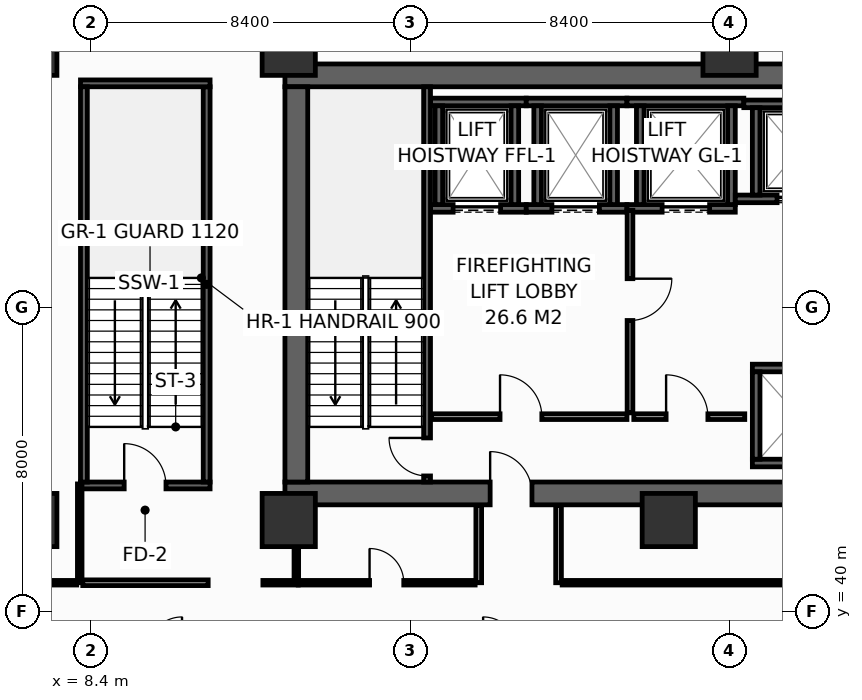
"""IFC4 building model, lengths in metres.
Left out: names, types, materials, properties, quantities, classifications, styles, units other than length and angle.
Written with IfcOpenShell. Run it as: python <this file> out.ifc"""

import sys

from ifc_helpers import new_model, si_unit, direction, frame, frame_2d, origin, origin_2d, place, context, subcontext, project, spatial, rectangle, hollow_rectangle, extrude, element, fill, save


model = new_model("IFC4")
c1 = context("Model", 3, precision=1e-05, world=origin(), true_north=direction((0.0, 1.0)))
c2 = subcontext(c1, "Body", "Model", "MODEL_VIEW")
j1 = project(units=[si_unit("LENGTHUNIT", "METRE"), si_unit("PLANEANGLEUNIT", "RADIAN")], contexts=[c1])
p1 = place(None, origin())
s1 = spatial("IfcSite", under=j1, at=p1, CompositionType="ELEMENT")
p2 = place(p1, origin())
s2 = spatial("IfcBuilding", under=s1, at=p2, CompositionType="ELEMENT")
p3 = place(p2, frame((0.0, 0.0, 33.0)))
s3 = spatial("IfcBuildingStorey", under=s2, at=p3, CompositionType="ELEMENT", Elevation=33.0)
p4 = place(p3, frame((13.5, 43.1, 0.0), z_axis=(0.0, 0.0, 1.0), x_axis=(1.0, 0.0, 0.0)))
e1 = element("IfcWall", 1, at=p4, inside=s3, PredefinedType="SHEAR", context=c2, shape_type="SweptSolid", body=[
    extrude(rectangle(XDim=32.9, YDim=0.6, at=frame_2d((16.45, 0.0))), origin(), (0.0, 0.0, 1.0), 4.95),
])
p5 = place(p4, frame((5.4, 0.0, 0.0)))
e2 = element("IfcOpeningElement", 2, at=p5, cuts=e1, PredefinedType="OPENING", context=c2, shape_type="SweptSolid", body=[
    extrude(rectangle(XDim=1.1, YDim=2.15, at=frame_2d((0.55, 1.075))), frame((0.0, 0.31, 0.0), z_axis=(0.0, -1.0, 0.0), x_axis=(1.0, 0.0, 0.0)), (0.0, 0.0, 1.0), 0.62),
])
p6 = place(p4, frame((25.6, 0.0, 0.0)))
e3 = element("IfcOpeningElement", 3, at=p6, cuts=e1, PredefinedType="OPENING", context=c2, shape_type="SweptSolid", body=[
    extrude(rectangle(XDim=1.1, YDim=2.15, at=frame_2d((0.55, 1.075))), frame((0.0, 0.31, 0.0), z_axis=(0.0, -1.0, 0.0), x_axis=(1.0, 0.0, 0.0)), (0.0, 0.0, 1.0), 0.62),
])
p7 = place(p3, frame((13.5, 54.1, 0.0), z_axis=(0.0, 0.0, 1.0), x_axis=(1.0, 0.0, 0.0)))
e4 = element("IfcWall", 4, at=p7, inside=s3, PredefinedType="SHEAR", context=c2, shape_type="SweptSolid", body=[
    extrude(rectangle(XDim=32.9, YDim=0.6, at=frame_2d((16.45, 0.0))), origin(), (0.0, 0.0, 1.0), 4.95),
])
p8 = place(p3, frame((13.8, 43.4, 0.0), z_axis=(0.0, 0.0, 1.0), x_axis=(0.0, 1.0, 0.0)))
e5 = element("IfcWall", 5, at=p8, inside=s3, PredefinedType="SHEAR", context=c2, shape_type="SweptSolid", body=[
    extrude(rectangle(XDim=10.4, YDim=0.6, at=frame_2d((5.2, 0.0))), origin(), (0.0, 0.0, 1.0), 4.95),
])
for number, where, z_axis, x_axis in (
    (6, (6.8, 54.8, 0.0), (0.0, 0.0, 1.0), (1.0, 0.0, 0.0)),
    (7, (13.6, 54.8, 0.0), (0.0, 0.0, 1.0), (1.0, 0.0, 0.0)),
    (8, (25.2, 54.8, 0.0), (0.0, 0.0, 1.0), (1.0, 0.0, 0.0)),
    (9, (6.8, 42.4, 0.0), (0.0, 0.0, 1.0), (1.0, 0.0, 0.0)),
    (10, (13.6, 42.4, 0.0), (0.0, 0.0, 1.0), (1.0, 0.0, 0.0)),
    (11, (23.6, 42.4, 0.0), (0.0, 0.0, 1.0), (1.0, 0.0, 0.0)),
):
    element("IfcColumn", number, at=place(p3, frame(where, z_axis=z_axis, x_axis=x_axis)), inside=s3, PredefinedType="COLUMN", context=c2, shape_type="SweptSolid", body=[
        extrude(hollow_rectangle(XDim=1.4, YDim=1.4, WallThickness=0.065, at=origin_2d()), origin(), (0.0, 0.0, 1.0), 5.4),
    ])
p9 = place(p3, frame((17.33, 50.6, 0.0), z_axis=(0.0, 0.0, 1.0), x_axis=(1.0, 0.0, 0.0)))
e12 = element("IfcWall", 12, at=p9, inside=s3, PredefinedType="SHEAR", context=c2, shape_type="SweptSolid", body=[
    extrude(rectangle(XDim=2.52, YDim=0.2, at=frame_2d((1.26, 0.0))), origin(), (0.0, 0.0, 1.0), 4.95),
])
p10 = place(p9, frame((0.595, 0.0, 0.0)))
e13 = element("IfcOpeningElement", 13, at=p10, cuts=e12, PredefinedType="OPENING", context=c2, shape_type="SweptSolid", body=[
    extrude(rectangle(XDim=1.25, YDim=2.3, at=frame_2d((0.625, 1.15))), frame((0.0, 0.11, 0.0), z_axis=(0.0, -1.0, 0.0), x_axis=(1.0, 0.0, 0.0)), (0.0, 0.0, 1.0), 0.22),
])
p11 = place(p3, frame((17.33, 53.4, 0.0), z_axis=(0.0, 0.0, 1.0), x_axis=(1.0, 0.0, 0.0)))
e14 = element("IfcWall", 14, at=p11, inside=s3, PredefinedType="SHEAR", context=c2, shape_type="SweptSolid", body=[
    extrude(rectangle(XDim=2.52, YDim=0.2, at=frame_2d((1.26, 0.0))), origin(), (0.0, 0.0, 1.0), 4.95),
])
for number, where, z_axis, x_axis in (
    (15, (17.55, 50.7, 0.0), (0.0, 0.0, 1.0), (0.0, 1.0, 0.0)),
    (16, (19.55, 50.7, 0.0), (0.0, 0.0, 1.0), (0.0, 1.0, 0.0)),
):
    element("IfcWall", number, at=place(p3, frame(where, z_axis=z_axis, x_axis=x_axis)), inside=s3, PredefinedType="SHEAR", context=c2, shape_type="SweptSolid", body=[
        extrude(rectangle(XDim=2.6, YDim=0.2, at=frame_2d((1.3, 0.0))), origin(), (0.0, 0.0, 1.0), 4.95),
    ])
p12 = place(p3, frame((19.85, 50.6, 0.0), z_axis=(0.0, 0.0, 1.0), x_axis=(1.0, 0.0, 0.0)))
e17 = element("IfcWall", 17, at=p12, inside=s3, PredefinedType="SHEAR", context=c2, shape_type="SweptSolid", body=[
    extrude(rectangle(XDim=2.65, YDim=0.2, at=frame_2d((1.325, 0.0))), origin(), (0.0, 0.0, 1.0), 4.95),
])
p13 = place(p12, frame((0.675, 0.0, 0.0)))
e18 = element("IfcOpeningElement", 18, at=p13, cuts=e17, PredefinedType="OPENING", context=c2, shape_type="SweptSolid", body=[
    extrude(rectangle(XDim=1.25, YDim=2.3, at=frame_2d((0.625, 1.15))), frame((0.0, 0.11, 0.0), z_axis=(0.0, -1.0, 0.0), x_axis=(1.0, 0.0, 0.0)), (0.0, 0.0, 1.0), 0.22),
])
p14 = place(p3, frame((19.85, 53.4, 0.0), z_axis=(0.0, 0.0, 1.0), x_axis=(1.0, 0.0, 0.0)))
e19 = element("IfcWall", 19, at=p14, inside=s3, PredefinedType="SHEAR", context=c2, shape_type="SweptSolid", body=[
    extrude(rectangle(XDim=2.65, YDim=0.2, at=frame_2d((1.325, 0.0))), origin(), (0.0, 0.0, 1.0), 4.95),
])
for number, where, z_axis, x_axis in (
    (20, (20.15, 50.7, 0.0), (0.0, 0.0, 1.0), (0.0, 1.0, 0.0)),
    (21, (22.15, 50.7, 0.0), (0.0, 0.0, 1.0), (0.0, 1.0, 0.0)),
):
    element("IfcWall", number, at=place(p3, frame(where, z_axis=z_axis, x_axis=x_axis)), inside=s3, PredefinedType="SHEAR", context=c2, shape_type="SweptSolid", body=[
        extrude(rectangle(XDim=2.6, YDim=0.2, at=frame_2d((1.3, 0.0))), origin(), (0.0, 0.0, 1.0), 4.95),
    ])
p15 = place(p3, frame((22.5, 50.6, 0.0), z_axis=(0.0, 0.0, 1.0), x_axis=(1.0, 0.0, 0.0)))
e22 = element("IfcWall", 22, at=p15, inside=s3, PredefinedType="SHEAR", context=c2, shape_type="SweptSolid", body=[
    extrude(rectangle(XDim=2.85, YDim=0.2, at=frame_2d((1.425, 0.0))), origin(), (0.0, 0.0, 1.0), 4.95),
])
p16 = place(p15, frame((0.925, 0.0, 0.0)))
e23 = element("IfcOpeningElement", 23, at=p16, cuts=e22, PredefinedType="OPENING", context=c2, shape_type="SweptSolid", body=[
    extrude(rectangle(XDim=1.25, YDim=2.3, at=frame_2d((0.625, 1.15))), frame((0.0, 0.11, 0.0), z_axis=(0.0, -1.0, 0.0), x_axis=(1.0, 0.0, 0.0)), (0.0, 0.0, 1.0), 0.22),
])
p17 = place(p3, frame((22.5, 53.4, 0.0), z_axis=(0.0, 0.0, 1.0), x_axis=(1.0, 0.0, 0.0)))
e24 = element("IfcWall", 24, at=p17, inside=s3, PredefinedType="SHEAR", context=c2, shape_type="SweptSolid", body=[
    extrude(rectangle(XDim=3.075, YDim=0.2, at=frame_2d((1.538, 0.0))), origin(), (0.0, 0.0, 1.0), 4.95),
])
for number, where, z_axis, x_axis in (
    (25, (22.85, 50.7, 0.0), (0.0, 0.0, 1.0), (0.0, 1.0, 0.0)),
    (26, (25.25, 50.7, 0.0), (0.0, 0.0, 1.0), (0.0, 1.0, 0.0)),
):
    element("IfcWall", number, at=place(p3, frame(where, z_axis=z_axis, x_axis=x_axis)), inside=s3, PredefinedType="SHEAR", context=c2, shape_type="SweptSolid", body=[
        extrude(rectangle(XDim=2.6, YDim=0.2, at=frame_2d((1.3, 0.0))), origin(), (0.0, 0.0, 1.0), 4.95),
    ])
p18 = place(p3, frame((25.35, 50.85, 0.0), z_axis=(0.0, 0.0, 1.0), x_axis=(1.0, 0.0, 0.0)))
e27 = element("IfcWall", 27, at=p18, inside=s3, PredefinedType="SHEAR", context=c2, shape_type="SweptSolid", body=[
    extrude(rectangle(XDim=3.025, YDim=0.2, at=frame_2d((1.512, 0.0))), origin(), (0.0, 0.0, 1.0), 4.95),
])
p19 = place(p18, frame((1.1, 0.0, 0.0)))
e28 = element("IfcOpeningElement", 28, at=p19, cuts=e27, PredefinedType="OPENING", context=c2, shape_type="SweptSolid", body=[
    extrude(rectangle(XDim=1.1, YDim=2.2, at=frame_2d((0.55, 1.1))), frame((0.0, 0.11, 0.0), z_axis=(0.0, -1.0, 0.0), x_axis=(1.0, 0.0, 0.0)), (0.0, 0.0, 1.0), 0.22),
])
p20 = place(p3, frame((25.575, 53.35, 0.0), z_axis=(0.0, 0.0, 1.0), x_axis=(1.0, 0.0, 0.0)))
e29 = element("IfcWall", 29, at=p20, inside=s3, PredefinedType="SHEAR", context=c2, shape_type="SweptSolid", body=[
    extrude(rectangle(XDim=2.8, YDim=0.2, at=frame_2d((1.4, 0.0))), origin(), (0.0, 0.0, 1.0), 4.95),
])
p21 = place(p3, frame((25.9, 50.95, 0.0), z_axis=(0.0, 0.0, 1.0), x_axis=(0.0, 1.0, 0.0)))
e30 = element("IfcWall", 30, at=p21, inside=s3, PredefinedType="SHEAR", context=c2, shape_type="SweptSolid", body=[
    extrude(rectangle(XDim=2.3, YDim=0.2, at=frame_2d((1.15, 0.0))), origin(), (0.0, 0.0, 1.0), 4.95),
])
for number, where, z_axis, x_axis in (
    (31, (25.8, 43.9, 0.0), (0.0, 0.0, 1.0), (1.0, 0.0, 0.0)),
    (32, (25.8, 46.4, 0.0), (0.0, 0.0, 1.0), (1.0, 0.0, 0.0)),
):
    element("IfcWall", number, at=place(p3, frame(where, z_axis=z_axis, x_axis=x_axis)), inside=s3, PredefinedType="SHEAR", context=c2, shape_type="SweptSolid", body=[
        extrude(rectangle(XDim=2.575, YDim=0.2, at=frame_2d((1.288, 0.0))), origin(), (0.0, 0.0, 1.0), 4.95),
    ])
p22 = place(p3, frame((25.9, 44.0, 0.0), z_axis=(0.0, 0.0, 1.0), x_axis=(0.0, 1.0, 0.0)))
e33 = element("IfcWall", 33, at=p22, inside=s3, PredefinedType="SHEAR", context=c2, shape_type="SweptSolid", body=[
    extrude(rectangle(XDim=2.3, YDim=0.2, at=frame_2d((1.15, 0.0))), origin(), (0.0, 0.0, 1.0), 4.95),
])
p23 = place(p3, frame((17.24, 43.4, 0.0), z_axis=(0.0, 0.0, 1.0), x_axis=(0.0, 1.0, 0.0)))
e34 = element("IfcWall", 34, at=p23, inside=s3, PredefinedType="SHEAR", context=c2, shape_type="SweptSolid", body=[
    extrude(rectangle(XDim=10.4, YDim=0.18, at=frame_2d((5.2, 0.0))), origin(), (0.0, 0.0, 1.0), 4.95),
])
p24 = place(p23, frame((0.16, 0.0, 0.0)))
e35 = element("IfcOpeningElement", 35, at=p24, cuts=e34, PredefinedType="OPENING", context=c2, shape_type="SweptSolid", body=[
    extrude(rectangle(XDim=1.0, YDim=2.15, at=frame_2d((0.5, 1.075))), frame((0.0, 0.1, 0.0), z_axis=(0.0, -1.0, 0.0), x_axis=(1.0, 0.0, 0.0)), (0.0, 0.0, 1.0), 0.2),
])
p25 = place(p3, frame((8.12, 43.31, 0.0), z_axis=(0.0, 0.0, 1.0), x_axis=(1.0, 0.0, 0.0)))
e36 = element("IfcWall", 36, at=p25, inside=s3, PredefinedType="SHEAR", context=c2, shape_type="SweptSolid", body=[
    extrude(rectangle(XDim=3.41, YDim=0.18, at=frame_2d((1.705, 0.0))), origin(), (0.0, 0.0, 1.0), 4.95),
])
p26 = place(p25, frame((1.15, 0.0, 0.0)))
e37 = element("IfcOpeningElement", 37, at=p26, cuts=e36, PredefinedType="OPENING", context=c2, shape_type="SweptSolid", body=[
    extrude(rectangle(XDim=1.1, YDim=2.15, at=frame_2d((0.55, 1.075))), frame((0.0, 0.1, 0.0), z_axis=(0.0, -1.0, 0.0), x_axis=(1.0, 0.0, 0.0)), (0.0, 0.0, 1.0), 0.2),
])
p27 = place(p3, frame((11.44, 43.4, 0.0), z_axis=(0.0, 0.0, 1.0), x_axis=(0.0, 1.0, 0.0)))
e38 = element("IfcWall", 38, at=p27, inside=s3, PredefinedType="SHEAR", context=c2, shape_type="SweptSolid", body=[
    extrude(rectangle(XDim=10.4, YDim=0.18, at=frame_2d((5.2, 0.0))), origin(), (0.0, 0.0, 1.0), 4.95),
])
p28 = place(p3, frame((11.53, 53.89, 0.0), z_axis=(0.0, 0.0, 1.0), x_axis=(-1.0, 0.0, 0.0)))
e39 = element("IfcWall", 39, at=p28, inside=s3, PredefinedType="SHEAR", context=c2, shape_type="SweptSolid", body=[
    extrude(rectangle(XDim=3.41, YDim=0.18, at=frame_2d((1.705, 0.0))), origin(), (0.0, 0.0, 1.0), 4.95),
])
p29 = place(p3, frame((8.21, 53.8, 0.0), z_axis=(0.0, 0.0, 1.0), x_axis=(0.0, -1.0, 0.0)))
e40 = element("IfcWall", 40, at=p29, inside=s3, PredefinedType="SHEAR", context=c2, shape_type="SweptSolid", body=[
    extrude(rectangle(XDim=10.4, YDim=0.18, at=frame_2d((5.2, 0.0))), origin(), (0.0, 0.0, 1.0), 4.95),
])
p30 = place(p3, frame((17.36, 45.12, 0.0), z_axis=(0.0, 0.0, 1.0), x_axis=(1.0, 0.0, 0.0)))
e41 = element("IfcWall", 41, at=p30, inside=s3, PredefinedType="PARTITIONING", context=c2, shape_type="SweptSolid", body=[
    extrude(rectangle(XDim=5.14, YDim=0.15, at=frame_2d((2.57, 0.0))), origin(), (0.0, 0.0, 1.0), 4.95),
])
p31 = place(p30, frame((1.8, 0.0, 0.0)))
e42 = element("IfcOpeningElement", 42, at=p31, cuts=e41, PredefinedType="OPENING", context=c2, shape_type="SweptSolid", body=[
    extrude(rectangle(XDim=1.1, YDim=2.15, at=frame_2d((0.55, 1.075))), frame((0.0, 0.085, 0.0), z_axis=(0.0, -1.0, 0.0), x_axis=(1.0, 0.0, 0.0)), (0.0, 0.0, 1.0), 0.17),
])
p32 = place(p3, frame((22.58, 50.55, 0.0), z_axis=(0.0, 0.0, 1.0), x_axis=(0.0, -1.0, 0.0)))
e43 = element("IfcWall", 43, at=p32, inside=s3, PredefinedType="PARTITIONING", context=c2, shape_type="SweptSolid", body=[
    extrude(rectangle(XDim=5.33, YDim=0.15, at=frame_2d((2.665, 0.0))), origin(), (0.0, 0.0, 1.0), 4.95),
])
p33 = place(p32, frame((1.8, 0.0, 0.0)))
e44 = element("IfcOpeningElement", 44, at=p33, cuts=e43, PredefinedType="OPENING", context=c2, shape_type="SweptSolid", body=[
    extrude(rectangle(XDim=1.1, YDim=2.15, at=frame_2d((0.55, 1.075))), frame((0.0, 0.085, 0.0), z_axis=(0.0, -1.0, 0.0), x_axis=(1.0, 0.0, 0.0)), (0.0, 0.0, 1.0), 0.17),
])
p34 = place(p3, frame((22.68, 45.12, 0.0), z_axis=(0.0, 0.0, 1.0), x_axis=(1.0, 0.0, 0.0)))
e45 = element("IfcWall", 45, at=p34, inside=s3, PredefinedType="PARTITIONING", context=c2, shape_type="SweptSolid", body=[
    extrude(rectangle(XDim=2.92, YDim=0.15, at=frame_2d((1.46, 0.0))), origin(), (0.0, 0.0, 1.0), 4.95),
])
p35 = place(p34, frame((0.85, 0.0, 0.0)))
e46 = element("IfcOpeningElement", 46, at=p35, cuts=e45, PredefinedType="OPENING", context=c2, shape_type="SweptSolid", body=[
    extrude(rectangle(XDim=1.1, YDim=2.15, at=frame_2d((0.55, 1.075))), frame((0.0, 0.085, 0.0), z_axis=(0.0, -1.0, 0.0), x_axis=(1.0, 0.0, 0.0)), (0.0, 0.0, 1.0), 0.17),
])
p36 = place(p3, frame((12.92, 40.75, 0.0), z_axis=(0.0, 0.0, 1.0), x_axis=(1.0, 0.0, 0.0)))
e47 = element("IfcWall", 47, at=p36, inside=s3, PredefinedType="PARTITIONING", context=c2, shape_type="SweptSolid", body=[
    extrude(rectangle(XDim=0.93, YDim=0.12, at=frame_2d((0.465, 0.0))), origin(), (0.0, 0.0, 1.0), 4.95),
])
p37 = place(p3, frame((13.8, 40.83, 0.0), z_axis=(0.0, 0.0, 1.0), x_axis=(0.0, 1.0, 0.0)))
e48 = element("IfcWall", 48, at=p37, inside=s3, PredefinedType="PARTITIONING", context=c2, shape_type="SweptSolid", body=[
    extrude(rectangle(XDim=1.95, YDim=0.12, at=frame_2d((0.975, 0.0))), origin(), (0.0, 0.0, 1.0), 4.95),
])
p38 = place(p3, frame((8.1, 40.75, 0.0), z_axis=(0.0, 0.0, 1.0), x_axis=(0.0, 1.0, 0.0)))
e49 = element("IfcWall", 49, at=p38, inside=s3, PredefinedType="PARTITIONING", context=c2, shape_type="SweptSolid", body=[
    extrude(rectangle(XDim=2.6, YDim=0.12, at=frame_2d((1.3, 0.0))), origin(), (0.0, 0.0, 1.0), 3.535),
])
p39 = place(p3, frame((8.18, 40.75, 0.0), z_axis=(0.0, 0.0, 1.0), x_axis=(1.0, 0.0, 0.0)))
e50 = element("IfcWall", 50, at=p39, inside=s3, PredefinedType="PARTITIONING", context=c2, shape_type="SweptSolid", body=[
    extrude(rectangle(XDim=3.3, YDim=0.15, at=frame_2d((1.65, 0.0))), origin(), (0.0, 0.0, 1.0), 3.535),
])
p40 = place(p3, frame((5.979, 40.75, 0.0), z_axis=(0.0, 0.0, 1.0), x_axis=(1.0, 0.0, 0.0)))
e51 = element("IfcWall", 51, at=p40, inside=s3, PredefinedType="PARTITIONING", context=c2, shape_type="SweptSolid", body=[
    extrude(rectangle(XDim=2.041, YDim=0.12, at=frame_2d((1.02, 0.0))), origin(), (0.0, 0.0, 1.0), 3.135),
])
for number, where, z_axis, x_axis in (
    (52, (18.6, 40.75, 0.0), (0.0, 0.0, 1.0), (0.0, 1.0, 0.0)),
    (53, (20.7, 40.75, 0.0), (0.0, 0.0, 1.0), (0.0, 1.0, 0.0)),
):
    element("IfcWall", number, at=place(p3, frame(where, z_axis=z_axis, x_axis=x_axis)), inside=s3, PredefinedType="PARTITIONING", context=c2, shape_type="SweptSolid", body=[
        extrude(rectangle(XDim=2.03, YDim=0.15, at=frame_2d((1.015, 0.0))), origin(), (0.0, 0.0, 1.0), 4.95),
    ])
p41 = place(p3, frame((13.85, 40.75, 0.0), z_axis=(0.0, 0.0, 1.0), x_axis=(1.0, 0.0, 0.0)))
e54 = element("IfcWall", 54, at=p41, inside=s3, PredefinedType="PARTITIONING", context=c2, shape_type="SweptSolid", body=[
    extrude(rectangle(XDim=4.655, YDim=0.12, at=frame_2d((2.327, 0.0))), origin(), (0.0, 0.0, 1.0), 4.95),
])
p42 = place(p41, frame((1.877, 0.0, 0.0)))
e55 = element("IfcOpeningElement", 55, at=p42, cuts=e54, PredefinedType="OPENING", context=c2, shape_type="SweptSolid", body=[
    extrude(rectangle(XDim=0.9, YDim=2.1, at=frame_2d((0.45, 1.05))), frame((0.0, 0.07, 0.0), z_axis=(0.0, -1.0, 0.0), x_axis=(1.0, 0.0, 0.0)), (0.0, 0.0, 1.0), 0.14),
])
p43 = place(p3, frame((20.795, 40.75, 0.0), z_axis=(0.0, 0.0, 1.0), x_axis=(1.0, 0.0, 0.0)))
e56 = element("IfcWall", 56, at=p43, inside=s3, PredefinedType="PARTITIONING", context=c2, shape_type="SweptSolid", body=[
    extrude(rectangle(XDim=17.91, YDim=0.12, at=frame_2d((8.955, 0.0))), origin(), (0.0, 0.0, 1.0), 3.535),
])
p44 = place(p43, frame((8.505, 0.0, 0.0)))
e57 = element("IfcOpeningElement", 57, at=p44, cuts=e56, PredefinedType="OPENING", context=c2, shape_type="SweptSolid", body=[
    extrude(rectangle(XDim=0.9, YDim=2.1, at=frame_2d((0.45, 1.05))), frame((0.0, 0.07, 0.0), z_axis=(0.0, -1.0, 0.0), x_axis=(1.0, 0.0, 0.0)), (0.0, 0.0, 1.0), 0.14),
])
p45 = place(p10, origin())
e58 = element("IfcDoor", 58, at=p45, inside=s3, OperationType="SLIDING_TO_LEFT", PredefinedType="DOOR", context=c2, shape_type="SweptSolid", body=[
    extrude(rectangle(XDim=1.25, YDim=2.3, at=frame_2d((0.625, 1.15))), frame((0.0, 0.025, 0.0), z_axis=(0.0, -1.0, 0.0), x_axis=(1.0, 0.0, 0.0)), (0.0, 0.0, 1.0), 0.05),
])
fill(e13, e58)
p46 = place(p13, origin())
e59 = element("IfcDoor", 59, at=p46, inside=s3, OperationType="SLIDING_TO_LEFT", PredefinedType="DOOR", context=c2, shape_type="SweptSolid", body=[
    extrude(rectangle(XDim=1.25, YDim=2.3, at=frame_2d((0.625, 1.15))), frame((0.0, 0.025, 0.0), z_axis=(0.0, -1.0, 0.0), x_axis=(1.0, 0.0, 0.0)), (0.0, 0.0, 1.0), 0.05),
])
fill(e18, e59)
p47 = place(p16, origin())
e60 = element("IfcDoor", 60, at=p47, inside=s3, OperationType="SLIDING_TO_LEFT", PredefinedType="DOOR", context=c2, shape_type="SweptSolid", body=[
    extrude(rectangle(XDim=1.25, YDim=2.3, at=frame_2d((0.625, 1.15))), frame((0.0, 0.025, 0.0), z_axis=(0.0, -1.0, 0.0), x_axis=(1.0, 0.0, 0.0)), (0.0, 0.0, 1.0), 0.05),
])
fill(e23, e60)
p48 = place(p19, origin())
e61 = element("IfcDoor", 61, at=p48, inside=s3, OperationType="SLIDING_TO_LEFT", PredefinedType="DOOR", context=c2, shape_type="SweptSolid", body=[
    extrude(rectangle(XDim=1.1, YDim=2.2, at=frame_2d((0.55, 1.1))), frame((0.0, 0.025, 0.0), z_axis=(0.0, -1.0, 0.0), x_axis=(1.0, 0.0, 0.0)), (0.0, 0.0, 1.0), 0.05),
])
fill(e28, e61)
p49 = place(p24, origin())
e62 = element("IfcDoor", 62, at=p49, inside=s3, OperationType="SINGLE_SWING_RIGHT", PredefinedType="DOOR", context=c2, shape_type="SweptSolid", body=[
    extrude(rectangle(XDim=1.0, YDim=2.15, at=frame_2d((0.5, 1.075))), frame((0.0, 0.025, 0.0), z_axis=(0.0, -1.0, 0.0), x_axis=(1.0, 0.0, 0.0)), (0.0, 0.0, 1.0), 0.05),
])
fill(e35, e62)
p50 = place(p26, origin())
e63 = element("IfcDoor", 63, at=p50, inside=s3, OperationType="SINGLE_SWING_LEFT", PredefinedType="DOOR", context=c2, shape_type="SweptSolid", body=[
    extrude(rectangle(XDim=1.1, YDim=2.15, at=frame_2d((0.55, 1.075))), frame((0.0, 0.025, 0.0), z_axis=(0.0, -1.0, 0.0), x_axis=(1.0, 0.0, 0.0)), (0.0, 0.0, 1.0), 0.05),
])
fill(e37, e63)
p51 = place(p31, origin())
e64 = element("IfcDoor", 64, at=p51, inside=s3, OperationType="SINGLE_SWING_LEFT", PredefinedType="DOOR", context=c2, shape_type="SweptSolid", body=[
    extrude(rectangle(XDim=1.1, YDim=2.15, at=frame_2d((0.55, 1.075))), frame((0.0, 0.025, 0.0), z_axis=(0.0, -1.0, 0.0), x_axis=(1.0, 0.0, 0.0)), (0.0, 0.0, 1.0), 0.05),
])
fill(e42, e64)
p52 = place(p33, origin())
e65 = element("IfcDoor", 65, at=p52, inside=s3, OperationType="SINGLE_SWING_LEFT", PredefinedType="DOOR", context=c2, shape_type="SweptSolid", body=[
    extrude(rectangle(XDim=1.1, YDim=2.15, at=frame_2d((0.55, 1.075))), frame((0.0, 0.025, 0.0), z_axis=(0.0, -1.0, 0.0), x_axis=(1.0, 0.0, 0.0)), (0.0, 0.0, 1.0), 0.05),
])
fill(e44, e65)
p53 = place(p35, origin())
e66 = element("IfcDoor", 66, at=p53, inside=s3, OperationType="SINGLE_SWING_LEFT", PredefinedType="DOOR", context=c2, shape_type="SweptSolid", body=[
    extrude(rectangle(XDim=1.1, YDim=2.15, at=frame_2d((0.55, 1.075))), frame((0.0, 0.025, 0.0), z_axis=(0.0, -1.0, 0.0), x_axis=(1.0, 0.0, 0.0)), (0.0, 0.0, 1.0), 0.05),
])
fill(e46, e66)
p54 = place(p5, origin())
e67 = element("IfcDoor", 67, at=p54, inside=s3, OperationType="SINGLE_SWING_LEFT", PredefinedType="DOOR", context=c2, shape_type="SweptSolid", body=[
    extrude(rectangle(XDim=1.1, YDim=2.15, at=frame_2d((0.55, 1.075))), frame((0.0, 0.025, 0.0), z_axis=(0.0, -1.0, 0.0), x_axis=(1.0, 0.0, 0.0)), (0.0, 0.0, 1.0), 0.05),
])
fill(e2, e67)
p55 = place(p42, origin())
e68 = element("IfcDoor", 68, at=p55, inside=s3, OperationType="SINGLE_SWING_LEFT", PredefinedType="DOOR", context=c2, shape_type="SweptSolid", body=[
    extrude(rectangle(XDim=0.9, YDim=2.1, at=frame_2d((0.45, 1.05))), frame((0.0, 0.025, 0.0), z_axis=(0.0, -1.0, 0.0), x_axis=(1.0, 0.0, 0.0)), (0.0, 0.0, 1.0), 0.05),
])
fill(e55, e68)
save(model, sys.argv[1])
